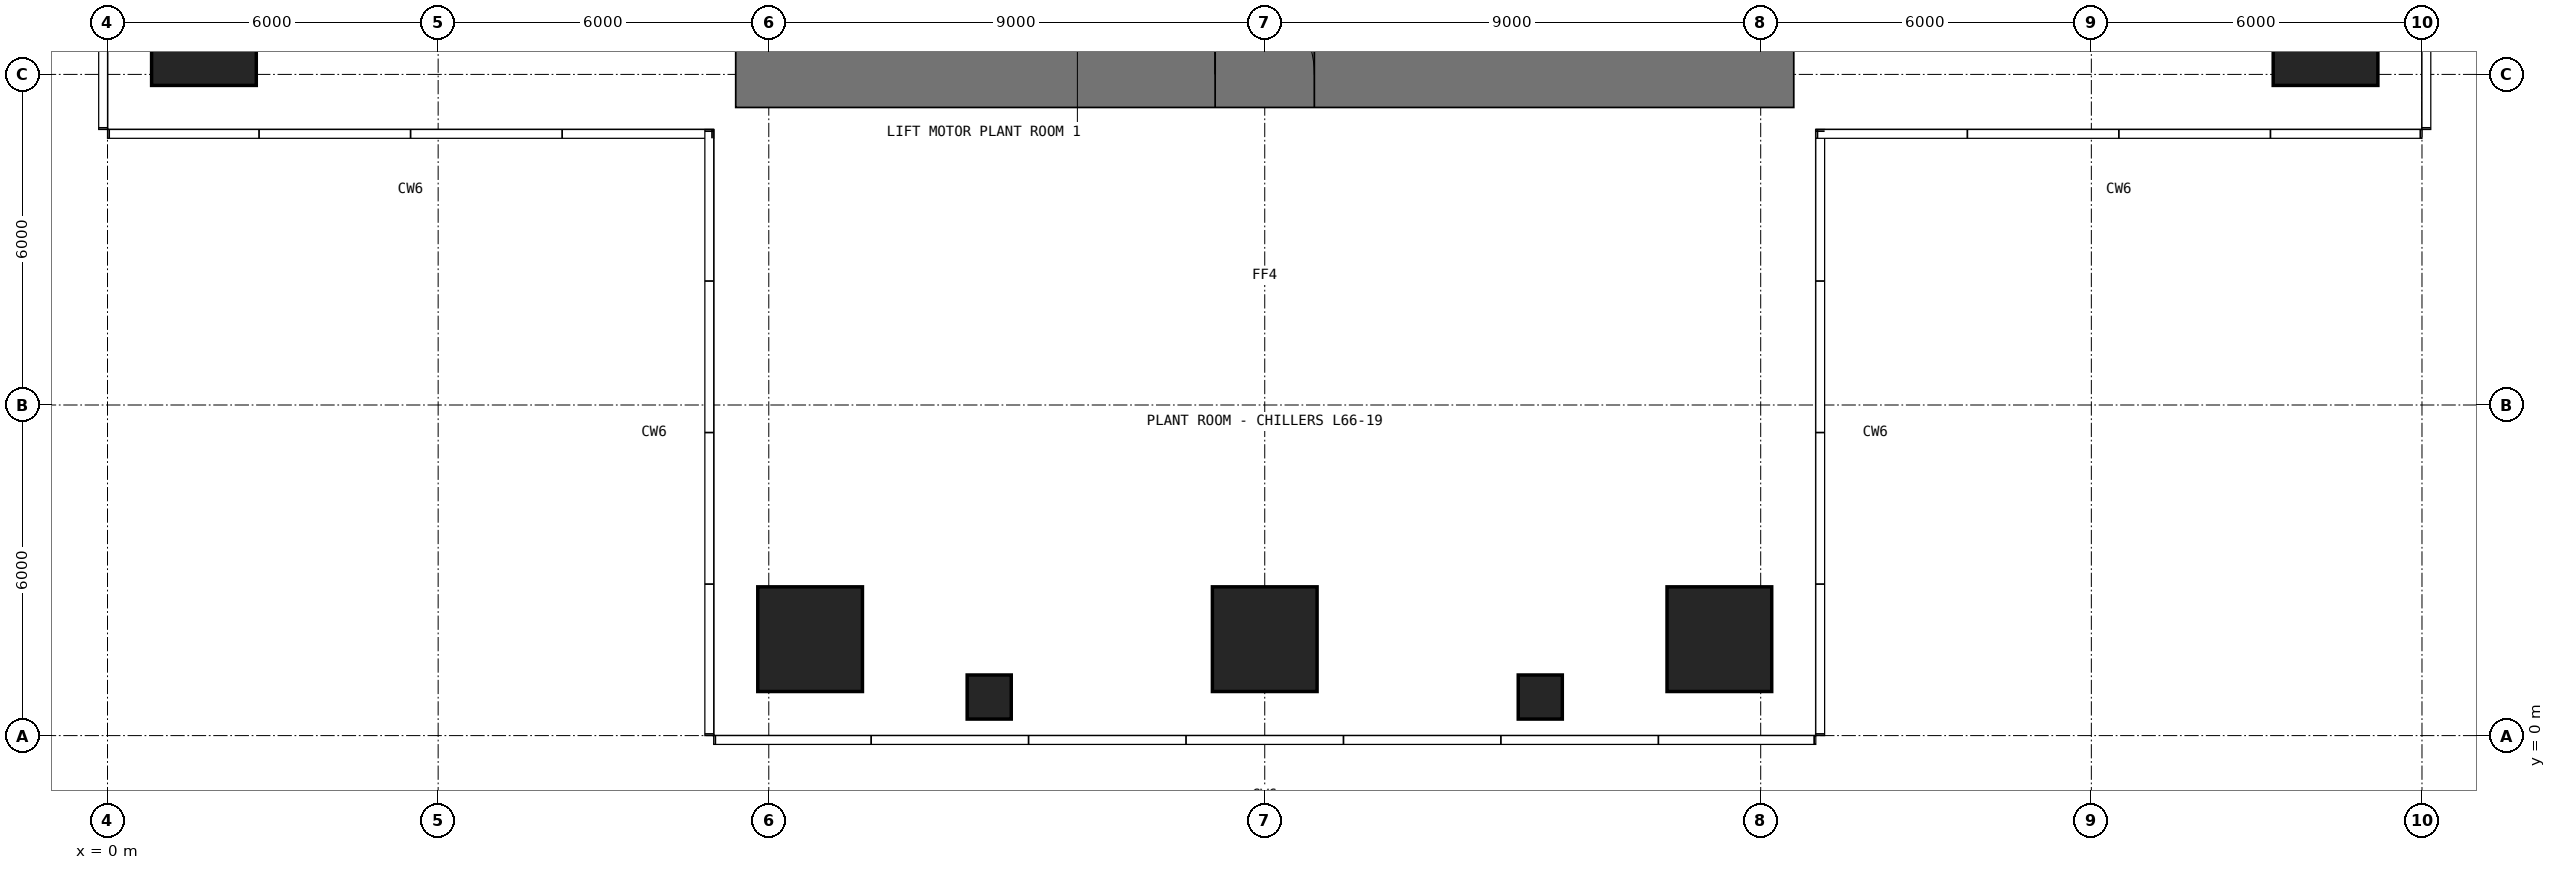
"""IFC4 building model, lengths in metres.
Left out: names, types, materials, properties, quantities, classifications, styles, units other than length and angle.
Written with IfcOpenShell. Run it as: python <this file> out.ifc"""

import sys

from ifc_helpers import new_model, si_unit, direction, frame, frame_2d, origin, origin_2d, place, context, subcontext, project, spatial, rectangle, extrude, element, fill, save


model = new_model("IFC4")
c1 = context("Model", 3, precision=1e-05, world=origin(), true_north=direction((0.0, 1.0)))
c2 = subcontext(c1, "Body", "Model", "MODEL_VIEW")
j1 = project(units=[si_unit("LENGTHUNIT", "METRE"), si_unit("PLANEANGLEUNIT", "RADIAN")], contexts=[c1])
p1 = place(None, origin())
s1 = spatial("IfcSite", under=j1, at=p1, CompositionType="ELEMENT")
p2 = place(p1, origin())
s2 = spatial("IfcBuilding", under=s1, at=p2, CompositionType="ELEMENT")
p3 = place(p2, frame((0.0, 0.0, 277.9)))
s3 = spatial("IfcBuildingStorey", under=s2, at=p3, CompositionType="ELEMENT", Elevation=277.9)
p4 = place(p3, frame((12.75, 1.75, 0.0), z_axis=(0.0, 0.0, 1.0), x_axis=(1.0, 0.0, 0.0)))
e1 = element("IfcColumn", 1, at=p4, inside=s3, PredefinedType="COLUMN", context=c2, shape_type="SweptSolid", body=[
    extrude(rectangle(XDim=1.9, YDim=1.9, at=origin_2d()), origin(), (0.0, 0.0, 1.0), 6.0),
])
p5 = place(p3, frame((16.0, 0.7, 0.0), z_axis=(0.0, 0.0, 1.0), x_axis=(1.0, 0.0, 0.0)))
e2 = element("IfcColumn", 2, at=p5, inside=s3, PredefinedType="COLUMN", context=c2, shape_type="SweptSolid", body=[
    extrude(rectangle(XDim=0.8, YDim=0.8, at=origin_2d()), origin(), (0.0, 0.0, 1.0), 6.0),
])
p6 = place(p3, frame((21.0, 1.75, 0.0), z_axis=(0.0, 0.0, 1.0), x_axis=(1.0, 0.0, 0.0)))
e3 = element("IfcColumn", 3, at=p6, inside=s3, PredefinedType="COLUMN", context=c2, shape_type="SweptSolid", body=[
    extrude(rectangle(XDim=1.9, YDim=1.9, at=origin_2d()), origin(), (0.0, 0.0, 1.0), 6.0),
])
p7 = place(p3, frame((26.0, 0.7, 0.0), z_axis=(0.0, 0.0, 1.0), x_axis=(1.0, 0.0, 0.0)))
e4 = element("IfcColumn", 4, at=p7, inside=s3, PredefinedType="COLUMN", context=c2, shape_type="SweptSolid", body=[
    extrude(rectangle(XDim=0.8, YDim=0.8, at=origin_2d()), origin(), (0.0, 0.0, 1.0), 6.0),
])
for number, where, z_axis, x_axis in (
    (5, (29.25, 1.75, 0.0), (0.0, 0.0, 1.0), (1.0, 0.0, 0.0)),
    (6, (1.75, 12.75, 0.0), (0.0, 0.0, 1.0), (1.0, 0.0, 0.0)),
    (7, (40.25, 12.75, 0.0), (0.0, 0.0, 1.0), (1.0, 0.0, 0.0)),
):
    element("IfcColumn", number, at=place(p3, frame(where, z_axis=z_axis, x_axis=x_axis)), inside=s3, PredefinedType="COLUMN", context=c2, shape_type="SweptSolid", body=[
        extrude(rectangle(XDim=1.9, YDim=1.9, at=origin_2d()), origin(), (0.0, 0.0, 1.0), 6.0),
    ])
p8 = place(p3, frame((11.4, 12.0, -0.1), z_axis=(0.0, 0.0, 1.0), x_axis=(1.0, 0.0, 0.0)))
e8 = element("IfcWall", 8, at=p8, inside=s3, PredefinedType="SHEAR", context=c2, shape_type="SweptSolid", body=[
    extrude(rectangle(XDim=19.2, YDim=1.2, at=frame_2d((9.6, 0.0))), origin(), (0.0, 0.0, 1.0), 6.0),
])
p9 = place(p8, frame((8.7, 0.0, 0.1)))
e9 = element("IfcOpeningElement", 9, at=p9, cuts=e8, PredefinedType="OPENING", context=c2, shape_type="SweptSolid", body=[
    extrude(rectangle(XDim=1.8, YDim=2.4, at=frame_2d((0.9, 1.2))), frame((0.0, 0.61, 0.0), z_axis=(0.0, -1.0, 0.0), x_axis=(1.0, 0.0, 0.0)), (0.0, 0.0, 1.0), 1.22),
])
p10 = place(p9, origin())
e10 = element("IfcDoor", 10, at=p10, inside=s3, OperationType="DOUBLE_DOOR_SINGLE_SWING", PredefinedType="DOOR", context=c2, shape_type="SweptSolid", body=[
    extrude(rectangle(XDim=1.8, YDim=2.4, at=frame_2d((0.9, 1.2))), frame((0.0, -0.275, 0.0), z_axis=(0.0, -1.0, 0.0), x_axis=(1.0, 0.0, 0.0)), (0.0, 0.0, 1.0), 0.05),
])
fill(e9, e10)
save(model, sys.argv[1])
